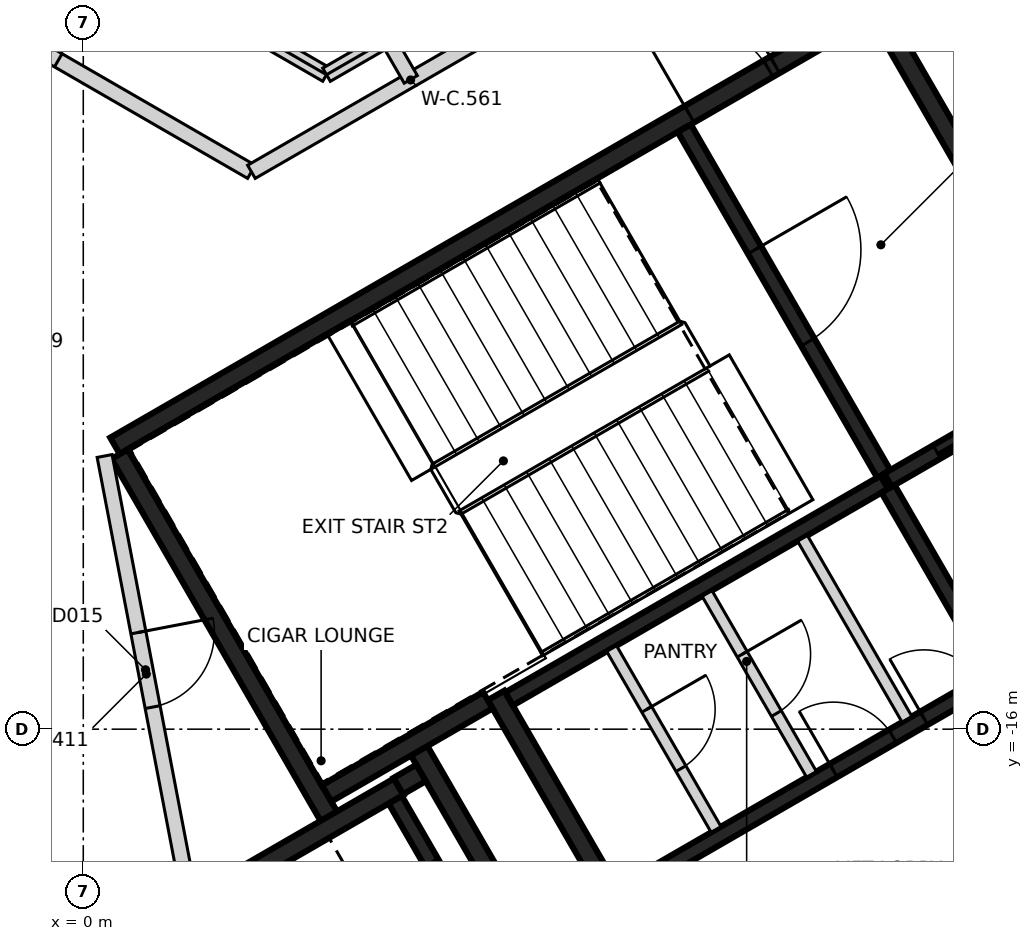
"""IFC4 building model, lengths in metres.
Left out: names, types, materials, properties, quantities, classifications, styles, units other than length and angle.
Written with IfcOpenShell. Run it as: python <this file> out.ifc"""

import sys

from ifc_helpers import new_model, si_unit, direction, frame, frame_2d, origin, place, context, subcontext, project, spatial, rectangle, extrude, element, fill, save


model = new_model("IFC4")
c1 = context("Model", 3, precision=1e-05, world=origin(), true_north=direction((0.0, 1.0)))
c2 = subcontext(c1, "Body", "Model", "MODEL_VIEW")
j1 = project(units=[si_unit("LENGTHUNIT", "METRE"), si_unit("PLANEANGLEUNIT", "RADIAN")], contexts=[c1])
p1 = place(None, origin())
s1 = spatial("IfcSite", under=j1, at=p1, CompositionType="ELEMENT")
p2 = place(p1, origin())
s2 = spatial("IfcBuilding", under=s1, at=p2, CompositionType="ELEMENT")
p3 = place(p2, frame((0.0, 0.0, 154.0)))
s3 = spatial("IfcBuildingStorey", under=s2, at=p3, CompositionType="ELEMENT", Elevation=154.0)
p4 = place(p3, frame((0.417, -12.273, 0.0), z_axis=(0.0, 0.0, 1.0), x_axis=(0.866021906294, 0.500006057782, 0.0)))
e1 = element("IfcWall", 1, at=p4, inside=s3, PredefinedType="SHEAR", context=c2, shape_type="SweptSolid", body=[
    extrude(rectangle(XDim=11.55, YDim=0.25, at=frame_2d((5.775, 0.0))), origin(), (0.0, 0.0, 1.0), 3.2),
])
p5 = place(p4, frame((10.025, 0.0, 0.0)))
e2 = element("IfcOpeningElement", 2, at=p5, cuts=e1, PredefinedType="OPENING", context=c2, shape_type="SweptSolid", body=[
    extrude(rectangle(XDim=1.2, YDim=2.1, at=frame_2d((0.6, 1.05))), frame((0.0, 0.135, 0.0), z_axis=(0.0, -1.0, 0.0), x_axis=(1.0, 0.0, 0.0)), (0.0, 0.0, 1.0), 0.27),
])
p6 = place(p4, frame((8.725, 0.0, 0.0)))
e3 = element("IfcOpeningElement", 3, at=p6, cuts=e1, PredefinedType="OPENING", context=c2, shape_type="SweptSolid", body=[
    extrude(rectangle(XDim=1.2, YDim=2.1, at=frame_2d((0.6, 1.05))), frame((0.0, 0.135, 0.0), z_axis=(0.0, -1.0, 0.0), x_axis=(1.0, 0.0, 0.0)), (0.0, 0.0, 1.0), 0.27),
])
p7 = place(p3, frame((3.235, -17.153, 0.0), z_axis=(0.0, 0.0, 1.0), x_axis=(-0.500008851346, 0.866020293397, 0.0)))
e4 = element("IfcWall", 4, at=p7, inside=s3, PredefinedType="SHEAR", context=c2, shape_type="SweptSolid", body=[
    extrude(rectangle(XDim=5.51, YDim=0.25, at=frame_2d((2.755, 0.0))), origin(), (0.0, 0.0, 1.0), 3.2),
])
p8 = place(p3, frame((10.483, -6.606, 0.0), z_axis=(0.0, 0.0, 1.0), x_axis=(0.49999885962, -0.866026062182, 0.0)))
e5 = element("IfcWall", 5, at=p8, inside=s3, PredefinedType="SHEAR", context=c2, shape_type="SweptSolid", body=[
    extrude(rectangle(XDim=5.225, YDim=0.25, at=frame_2d((2.612, 0.0))), origin(), (0.0, 0.0, 1.0), 3.2),
])
p9 = place(p3, frame((7.031, -18.327, 0.0), z_axis=(0.0, 0.0, 1.0), x_axis=(-0.499971222258, 0.866042017984, 0.0)))
e6 = element("IfcWall", 6, at=p9, inside=s3, PredefinedType="SHEAR", context=c2, shape_type="SweptSolid", body=[
    extrude(rectangle(XDim=3.2, YDim=0.25, at=frame_2d((1.6, 0.0))), origin(), (0.0, 0.0, 1.0), 3.2),
])
p10 = place(p3, frame((1.669, -18.19, 0.0), z_axis=(0.0, 0.0, 1.0), x_axis=(0.866042235819, 0.499970844928, 0.0)))
e7 = element("IfcWall", 7, at=p10, inside=s3, PredefinedType="SHEAR", context=c2, shape_type="SweptSolid", body=[
    extrude(rectangle(XDim=2.865, YDim=0.25, at=frame_2d((1.432, 0.0))), origin(), (0.0, 0.0, 1.0), 3.2),
])
p11 = place(p3, frame((4.414, -16.276, 0.0), z_axis=(0.0, 0.0, 1.0), x_axis=(0.500003324108, -0.866023484601, 0.0)))
e8 = element("IfcWall", 8, at=p11, inside=s3, PredefinedType="SHEAR", context=c2, shape_type="SweptSolid", body=[
    extrude(rectangle(XDim=3.085, YDim=0.25, at=frame_2d((1.542, 0.0))), origin(), (0.0, 0.0, 1.0), 3.2),
])
p12 = place(p3, frame((5.322, -15.619, 0.0), z_axis=(0.0, 0.0, 1.0), x_axis=(-0.866026229868, -0.499998569178, 0.0)))
e9 = element("IfcWall", 9, at=p12, inside=s3, PredefinedType="SHEAR", context=c2, shape_type="SweptSolid", body=[
    extrude(rectangle(XDim=2.449, YDim=0.25, at=frame_2d((1.225, 0.0))), origin(), (0.0, 0.0, 1.0), 3.2),
])
p13 = place(p3, frame((4.145, -16.749, 0.0), z_axis=(0.0, 0.0, 1.0), x_axis=(0.866185586049, 0.49972245349, 0.0)))
e10 = element("IfcWall", 10, at=p13, inside=s3, PredefinedType="SHEAR", context=c2, shape_type="SweptSolid", body=[
    extrude(rectangle(XDim=0.344, YDim=0.25, at=frame_2d((0.172, 0.0))), origin(), (0.0, 0.0, 1.0), 3.2),
])
p14 = place(p3, frame((9.052, -20.48, 0.0), z_axis=(0.0, 0.0, 1.0), x_axis=(0.866030299012, 0.499991521122, 0.0)))
e11 = element("IfcWall", 11, at=p14, inside=s3, PredefinedType="SHEAR", context=c2, shape_type="SweptSolid", body=[
    extrude(rectangle(XDim=6.1, YDim=0.2, at=frame_2d((3.05, 0.0))), origin(), (0.0, 0.0, 1.0), 3.2),
])
p15 = place(p14, frame((1.0, 0.0, 0.0)))
e12 = element("IfcOpeningElement", 12, at=p15, cuts=e11, PredefinedType="OPENING", context=c2, shape_type="SweptSolid", body=[
    extrude(rectangle(XDim=1.2, YDim=2.1, at=frame_2d((0.6, 1.05))), frame((0.0, 0.11, 0.0), z_axis=(0.0, -1.0, 0.0), x_axis=(1.0, 0.0, 0.0)), (0.0, 0.0, 1.0), 0.22),
])
p16 = place(p14, frame((4.05, 0.0, 0.0)))
e13 = element("IfcOpeningElement", 13, at=p16, cuts=e11, PredefinedType="OPENING", context=c2, shape_type="SweptSolid", body=[
    extrude(rectangle(XDim=1.2, YDim=2.1, at=frame_2d((0.6, 1.05))), frame((0.0, 0.11, 0.0), z_axis=(0.0, -1.0, 0.0), x_axis=(1.0, 0.0, 0.0)), (0.0, 0.0, 1.0), 0.22),
])
p17 = place(p3, frame((10.538, -12.752, 0.0), z_axis=(0.0, 0.0, 1.0), x_axis=(-0.866038630372, -0.499977090179, 0.0)))
e14 = element("IfcWall", 14, at=p17, inside=s3, PredefinedType="SHEAR", context=c2, shape_type="SweptSolid", body=[
    extrude(rectangle(XDim=5.699, YDim=0.2, at=frame_2d((2.85, 0.0))), origin(), (0.0, 0.0, 1.0), 3.2),
])
p18 = place(p3, frame((7.077, -18.156, 0.0), z_axis=(0.0, 0.0, 1.0), x_axis=(0.866038630372, 0.499977090179, 0.0)))
e15 = element("IfcWall", 15, at=p18, inside=s3, PredefinedType="SHEAR", context=c2, shape_type="SweptSolid", body=[
    extrude(rectangle(XDim=5.699, YDim=0.2, at=frame_2d((2.85, 0.0))), origin(), (0.0, 0.0, 1.0), 3.2),
])
p19 = place(p18, frame((3.224, 0.0, 0.0)))
e16 = element("IfcOpeningElement", 16, at=p19, cuts=e15, PredefinedType="OPENING", context=c2, shape_type="SweptSolid", body=[
    extrude(rectangle(XDim=0.9, YDim=2.1, at=frame_2d((0.45, 1.05))), frame((0.0, 0.11, 0.0), z_axis=(0.0, -1.0, 0.0), x_axis=(1.0, 0.0, 0.0)), (0.0, 0.0, 1.0), 0.22),
])
p20 = place(p18, frame((4.599, 0.0, 0.0)))
e17 = element("IfcOpeningElement", 17, at=p20, cuts=e15, PredefinedType="OPENING", context=c2, shape_type="SweptSolid", body=[
    extrude(rectangle(XDim=0.9, YDim=2.1, at=frame_2d((0.45, 1.05))), frame((0.0, 0.11, 0.0), z_axis=(0.0, -1.0, 0.0), x_axis=(1.0, 0.0, 0.0)), (0.0, 0.0, 1.0), 0.22),
])
p21 = place(p3, frame((7.906, -8.094, 0.0), z_axis=(0.0, 0.0, 1.0), x_axis=(0.500024287448, -0.866011380966, 0.0)))
e18 = element("IfcWall", 18, at=p21, inside=s3, PredefinedType="SHEAR", context=c2, shape_type="SweptSolid", body=[
    extrude(rectangle(XDim=5.251, YDim=0.2, at=frame_2d((2.625, 0.0))), origin(), (0.0, 0.0, 1.0), 3.2),
])
p22 = place(p21, frame((1.849, 0.0, 0.0)))
e19 = element("IfcOpeningElement", 19, at=p22, cuts=e18, PredefinedType="OPENING", context=c2, shape_type="SweptSolid", body=[
    extrude(rectangle(XDim=1.4, YDim=2.1, at=frame_2d((0.7, 1.05))), frame((0.0, 0.11, 0.0), z_axis=(0.0, -1.0, 0.0), x_axis=(1.0, 0.0, 0.0)), (0.0, 0.0, 1.0), 0.22),
])
p23 = place(p3, frame((5.503, -19.352, 0.0), z_axis=(0.0, 0.0, 1.0), x_axis=(-0.499986818241, 0.866033014143, 0.0)))
e20 = element("IfcWall", 20, at=p23, inside=s3, PredefinedType="SHEAR", context=c2, shape_type="SweptSolid", body=[
    extrude(rectangle(XDim=2.798, YDim=0.2, at=frame_2d((1.399, 0.0))), origin(), (0.0, 0.0, 1.0), 3.2),
])
p24 = place(p23, frame((0.949, 0.0, 0.0)))
e21 = element("IfcOpeningElement", 21, at=p24, cuts=e20, PredefinedType="OPENING", context=c2, shape_type="SweptSolid", body=[
    extrude(rectangle(XDim=0.9, YDim=2.1, at=frame_2d((0.45, 1.05))), frame((0.0, 0.11, 0.0), z_axis=(0.0, -1.0, 0.0), x_axis=(1.0, 0.0, 0.0)), (0.0, 0.0, 1.0), 0.22),
])
p25 = place(p3, frame((11.963, -15.22, 0.0), z_axis=(0.0, 0.0, 1.0), x_axis=(-0.500034990121, 0.866005201286, 0.0)))
e22 = element("IfcWall", 22, at=p25, inside=s3, PredefinedType="SHEAR", context=c2, shape_type="SweptSolid", body=[
    extrude(rectangle(XDim=2.75, YDim=0.2, at=frame_2d((1.375, 0.0))), origin(), (0.0, 0.0, 1.0), 3.2),
])
p26 = place(p3, frame((10.587, -12.723, 0.0), z_axis=(0.0, 0.0, 1.0), x_axis=(0.866037306777, 0.499979382845, 0.0)))
e23 = element("IfcWall", 23, at=p26, inside=s3, PredefinedType="SHEAR", context=c2, shape_type="SweptSolid", body=[
    extrude(rectangle(XDim=2.742, YDim=0.2, at=frame_2d((1.371, 0.0))), origin(), (0.0, 0.0, 1.0), 3.2),
])
p27 = place(p26, frame((0.743, 0.0, 0.0)))
e24 = element("IfcOpeningElement", 24, at=p27, cuts=e23, PredefinedType="OPENING", context=c2, shape_type="SweptSolid", body=[
    extrude(rectangle(XDim=1.3, YDim=2.1, at=frame_2d((0.65, 1.05))), frame((0.0, 0.11, 0.0), z_axis=(0.0, -1.0, 0.0), x_axis=(1.0, 0.0, 0.0)), (0.0, 0.0, 1.0), 0.22),
])
p28 = place(p3, frame((8.207, -14.214, 0.0), z_axis=(0.0, 0.0, 1.0), x_axis=(0.50002746344, -0.86600954718, 0.0)))
e25 = element("IfcWall", 25, at=p28, inside=s3, PredefinedType="PARTITIONING", context=c2, shape_type="SweptSolid", body=[
    extrude(rectangle(XDim=2.748, YDim=0.15, at=frame_2d((1.374, 0.0))), origin(), (0.0, 0.0, 1.0), 3.2),
])
p29 = place(p28, frame((0.924, 0.0, 0.0)))
e26 = element("IfcOpeningElement", 26, at=p29, cuts=e25, PredefinedType="OPENING", context=c2, shape_type="SweptSolid", body=[
    extrude(rectangle(XDim=0.9, YDim=2.1, at=frame_2d((0.45, 1.05))), frame((0.0, 0.085, 0.0), z_axis=(0.0, -1.0, 0.0), x_axis=(1.0, 0.0, 0.0)), (0.0, 0.0, 1.0), 0.17),
])
p30 = place(p3, frame((9.462, -13.489, 0.0), z_axis=(0.0, 0.0, 1.0), x_axis=(0.499988999718, -0.866031754707, 0.0)))
e27 = element("IfcWall", 27, at=p30, inside=s3, PredefinedType="PARTITIONING", context=c2, shape_type="SweptSolid", body=[
    extrude(rectangle(XDim=2.749, YDim=0.15, at=frame_2d((1.374, 0.0))), origin(), (0.0, 0.0, 1.0), 3.2),
])
p31 = place(p3, frame((6.951, -14.939, 0.0), z_axis=(0.0, 0.0, 1.0), x_axis=(0.499988999718, -0.866031754707, 0.0)))
e28 = element("IfcWall", 28, at=p31, inside=s3, PredefinedType="PARTITIONING", context=c2, shape_type="SweptSolid", body=[
    extrude(rectangle(XDim=2.749, YDim=0.15, at=frame_2d((1.374, 0.0))), origin(), (0.0, 0.0, 1.0), 3.2),
])
p32 = place(p31, frame((0.924, 0.0, 0.0)))
e29 = element("IfcOpeningElement", 29, at=p32, cuts=e28, PredefinedType="OPENING", context=c2, shape_type="SweptSolid", body=[
    extrude(rectangle(XDim=0.9, YDim=2.1, at=frame_2d((0.45, 1.05))), frame((0.0, 0.085, 0.0), z_axis=(0.0, -1.0, 0.0), x_axis=(1.0, 0.0, 0.0)), (0.0, 0.0, 1.0), 0.17),
])
p33 = place(p3, frame((-8.612, -2.418, 0.0), z_axis=(0.0, 0.0, 1.0), x_axis=(0.866023916678, -0.500002575735, 0.0)))
e30 = element("IfcWall", 30, at=p33, inside=s3, PredefinedType="PARTITIONING", context=c2, shape_type="SweptSolid", body=[
    extrude(rectangle(XDim=12.499, YDim=0.2, at=frame_2d((6.249, 0.0))), origin(), (0.0, 0.0, 1.0), 3.2),
])
p34 = place(p33, frame((2.427, 0.0, 0.0)))
e31 = element("IfcOpeningElement", 31, at=p34, cuts=e30, PredefinedType="OPENING", context=c2, shape_type="SweptSolid", body=[
    extrude(rectangle(XDim=0.9, YDim=2.1, at=frame_2d((0.45, 1.05))), frame((0.0, 0.11, 0.0), z_axis=(0.0, -1.0, 0.0), x_axis=(1.0, 0.0, 0.0)), (0.0, 0.0, 1.0), 0.22),
])
p35 = place(p33, frame((8.665, 0.0, 0.0)))
e32 = element("IfcOpeningElement", 32, at=p35, cuts=e30, PredefinedType="OPENING", context=c2, shape_type="SweptSolid", body=[
    extrude(rectangle(XDim=0.9, YDim=2.1, at=frame_2d((0.45, 1.05))), frame((0.0, 0.11, 0.0), z_axis=(0.0, -1.0, 0.0), x_axis=(1.0, 0.0, 0.0)), (0.0, 0.0, 1.0), 0.22),
])
p36 = place(p3, frame((0.281, -12.406, 0.0), z_axis=(0.0, 0.0, 1.0), x_axis=(0.187814940093, -0.982204433037, 0.0)))
e33 = element("IfcWall", 33, at=p36, inside=s3, PredefinedType="PARTITIONING", context=c2, shape_type="SweptSolid", body=[
    extrude(rectangle(XDim=5.842, YDim=0.2, at=frame_2d((2.921, 0.0))), origin(), (0.0, 0.0, 1.0), 3.2),
])
p37 = place(p36, frame((2.363, 0.0, 0.0)))
e34 = element("IfcOpeningElement", 34, at=p37, cuts=e33, PredefinedType="OPENING", context=c2, shape_type="SweptSolid", body=[
    extrude(rectangle(XDim=1.0, YDim=2.1, at=frame_2d((0.5, 1.05))), frame((0.0, 0.11, 0.0), z_axis=(0.0, -1.0, 0.0), x_axis=(1.0, 0.0, 0.0)), (0.0, 0.0, 1.0), 0.22),
])
p38 = place(p3, frame((2.212, -8.667, 0.0), z_axis=(0.0, 0.0, 1.0), x_axis=(0.866053587187, 0.499951181737, 0.0)))
e35 = element("IfcWall", 35, at=p38, inside=s3, PredefinedType="PARTITIONING", context=c2, shape_type="SweptSolid", body=[
    extrude(rectangle(XDim=4.835, YDim=0.2, at=frame_2d((2.418, 0.0))), origin(), (0.0, 0.0, 1.0), 2.3),
])
p39 = place(p3, frame((-8.0, -0.924, 0.0), z_axis=(0.0, 0.0, 1.0), x_axis=(0.866062358179, -0.499935987647, 0.0)))
e36 = element("IfcWall", 36, at=p39, inside=s3, PredefinedType="PARTITIONING", context=c2, shape_type="SweptSolid", body=[
    extrude(rectangle(XDim=12.932, YDim=0.2, at=frame_2d((6.466, 0.0))), origin(), (0.0, 0.0, 1.0), 2.3),
])
p40 = place(p3, frame((3.2, -7.39, 0.0), z_axis=(0.0, 0.0, 1.0), x_axis=(0.865875248522, 0.500259986404, 0.0)))
e37 = element("IfcWall", 37, at=p40, inside=s3, PredefinedType="PARTITIONING", context=c2, shape_type="SweptSolid", body=[
    extrude(rectangle(XDim=1.848, YDim=0.2, at=frame_2d((0.924, 0.0))), origin(), (0.0, 0.0, 1.0), 2.3),
])
p41 = place(p3, frame((4.005, -6.925, 0.0), z_axis=(0.0, 0.0, 1.0), x_axis=(0.499942781752, -0.866058436235, 0.0)))
e38 = element("IfcWall", 38, at=p41, inside=s3, PredefinedType="PARTITIONING", context=c2, shape_type="SweptSolid", body=[
    extrude(rectangle(XDim=0.607, YDim=0.2, at=frame_2d((0.304, 0.0))), origin(), (0.0, 0.0, 1.0), 2.3),
])
p42 = place(p27, origin())
e39 = element("IfcDoor", 39, at=p42, inside=s3, OperationType="SLIDING_TO_LEFT", PredefinedType="DOOR", context=c2, shape_type="SweptSolid", body=[
    extrude(rectangle(XDim=1.3, YDim=2.1, at=frame_2d((0.65, 1.05))), frame((0.0, 0.025, 0.0), z_axis=(0.0, -1.0, 0.0), x_axis=(1.0, 0.0, 0.0)), (0.0, 0.0, 1.0), 0.05),
])
fill(e24, e39)
p43 = place(p5, origin())
e40 = element("IfcDoor", 40, at=p43, inside=s3, OperationType="SINGLE_SWING_LEFT", PredefinedType="DOOR", context=c2, shape_type="SweptSolid", body=[
    extrude(rectangle(XDim=1.2, YDim=2.1, at=frame_2d((0.6, 1.05))), frame((0.0, 0.025, 0.0), z_axis=(0.0, -1.0, 0.0), x_axis=(1.0, 0.0, 0.0)), (0.0, 0.0, 1.0), 0.05),
])
fill(e2, e40)
p44 = place(p6, origin())
e41 = element("IfcDoor", 41, at=p44, inside=s3, OperationType="SINGLE_SWING_RIGHT", PredefinedType="DOOR", context=c2, shape_type="SweptSolid", body=[
    extrude(rectangle(XDim=1.2, YDim=2.1, at=frame_2d((0.6, 1.05))), frame((0.0, 0.025, 0.0), z_axis=(0.0, -1.0, 0.0), x_axis=(1.0, 0.0, 0.0)), (0.0, 0.0, 1.0), 0.05),
])
fill(e3, e41)
p45 = place(p22, origin())
e42 = element("IfcDoor", 42, at=p45, inside=s3, OperationType="SINGLE_SWING_LEFT", PredefinedType="DOOR", context=c2, shape_type="SweptSolid", body=[
    extrude(rectangle(XDim=1.4, YDim=2.1, at=frame_2d((0.7, 1.05))), frame((0.0, 0.025, 0.0), z_axis=(0.0, -1.0, 0.0), x_axis=(1.0, 0.0, 0.0)), (0.0, 0.0, 1.0), 0.05),
])
fill(e19, e42)
p46 = place(p19, origin())
e43 = element("IfcDoor", 43, at=p46, inside=s3, OperationType="SINGLE_SWING_RIGHT", PredefinedType="DOOR", context=c2, shape_type="SweptSolid", body=[
    extrude(rectangle(XDim=0.9, YDim=2.1, at=frame_2d((0.45, 1.05))), frame((0.0, 0.025, 0.0), z_axis=(0.0, -1.0, 0.0), x_axis=(1.0, 0.0, 0.0)), (0.0, 0.0, 1.0), 0.05),
])
fill(e16, e43)
p47 = place(p20, origin())
e44 = element("IfcDoor", 44, at=p47, inside=s3, OperationType="SINGLE_SWING_LEFT", PredefinedType="DOOR", context=c2, shape_type="SweptSolid", body=[
    extrude(rectangle(XDim=0.9, YDim=2.1, at=frame_2d((0.45, 1.05))), frame((0.0, 0.025, 0.0), z_axis=(0.0, -1.0, 0.0), x_axis=(1.0, 0.0, 0.0)), (0.0, 0.0, 1.0), 0.05),
])
fill(e17, e44)
p48 = place(p29, origin())
e45 = element("IfcDoor", 45, at=p48, inside=s3, OperationType="SINGLE_SWING_LEFT", PredefinedType="DOOR", context=c2, shape_type="SweptSolid", body=[
    extrude(rectangle(XDim=0.9, YDim=2.1, at=frame_2d((0.45, 1.05))), frame((0.0, 0.025, 0.0), z_axis=(0.0, -1.0, 0.0), x_axis=(1.0, 0.0, 0.0)), (0.0, 0.0, 1.0), 0.05),
])
fill(e26, e45)
p49 = place(p32, origin())
e46 = element("IfcDoor", 46, at=p49, inside=s3, OperationType="SINGLE_SWING_RIGHT", PredefinedType="DOOR", context=c2, shape_type="SweptSolid", body=[
    extrude(rectangle(XDim=0.9, YDim=2.1, at=frame_2d((0.45, 1.05))), frame((0.0, 0.025, 0.0), z_axis=(0.0, -1.0, 0.0), x_axis=(1.0, 0.0, 0.0)), (0.0, 0.0, 1.0), 0.05),
])
fill(e29, e46)
p50 = place(p37, origin())
e47 = element("IfcDoor", 47, at=p50, inside=s3, OperationType="SINGLE_SWING_LEFT", PredefinedType="DOOR", context=c2, shape_type="SweptSolid", body=[
    extrude(rectangle(XDim=1.0, YDim=2.1, at=frame_2d((0.5, 1.05))), frame((0.0, 0.025, 0.0), z_axis=(0.0, -1.0, 0.0), x_axis=(1.0, 0.0, 0.0)), (0.0, 0.0, 1.0), 0.05),
])
fill(e34, e47)
p51 = place(p35, origin())
e48 = element("IfcDoor", 48, at=p51, inside=s3, OperationType="SINGLE_SWING_LEFT", PredefinedType="DOOR", context=c2, shape_type="SweptSolid", body=[
    extrude(rectangle(XDim=0.9, YDim=2.1, at=frame_2d((0.45, 1.05))), frame((0.0, 0.025, 0.0), z_axis=(0.0, -1.0, 0.0), x_axis=(1.0, 0.0, 0.0)), (0.0, 0.0, 1.0), 0.05),
])
fill(e32, e48)
save(model, sys.argv[1])
